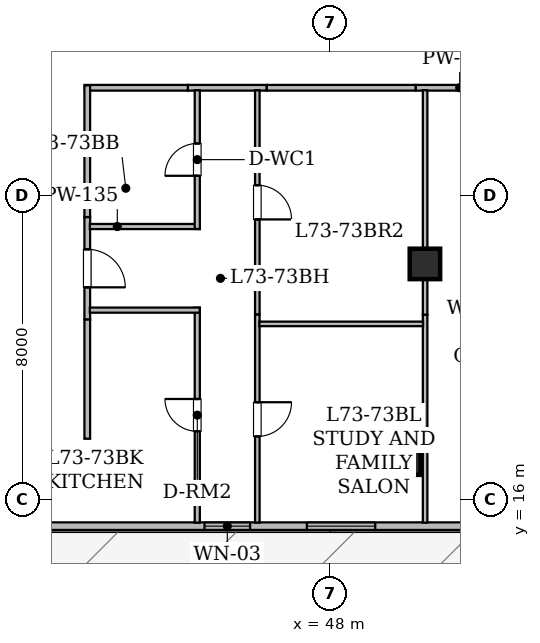
"""IFC4 building model, lengths in metres.
Left out: names, types, materials, properties, quantities, classifications, styles, units other than length and angle.
Written with IfcOpenShell. Run it as: python <this file> out.ifc"""

import sys

from ifc_helpers import new_model, si_unit, direction, frame, frame_2d, origin, origin_2d, place, context, subcontext, project, spatial, rectangle, hollow_rectangle, extrude, element, fill, save


model = new_model("IFC4")
c1 = context("Model", 3, precision=1e-05, world=origin(), true_north=direction((0.0, 1.0)))
c2 = subcontext(c1, "Body", "Model", "MODEL_VIEW")
j1 = project(units=[si_unit("LENGTHUNIT", "METRE"), si_unit("PLANEANGLEUNIT", "RADIAN")], contexts=[c1])
p1 = place(None, origin())
s1 = spatial("IfcSite", under=j1, at=p1, CompositionType="ELEMENT")
p2 = place(p1, origin())
s2 = spatial("IfcBuilding", under=s1, at=p2, CompositionType="ELEMENT")
p3 = place(p2, frame((0.0, 0.0, 286.25)))
s3 = spatial("IfcBuildingStorey", under=s2, at=p3, CompositionType="ELEMENT", Elevation=286.25)
p4 = place(p3, frame((49.983, 17.05, 0.025), z_axis=(0.0, 0.0, 1.0), x_axis=(1.0, 0.0, 0.0)))
e1 = element("IfcColumn", 1, at=p4, inside=s3, PredefinedType="COLUMN", context=c2, shape_type="SweptSolid", body=[
    extrude(hollow_rectangle(XDim=0.8, YDim=0.8, WallThickness=0.04, at=origin_2d()), origin(), (0.0, 0.0, 1.0), 4.175),
])
p5 = place(p3, frame((50.5, 22.2, 0.0), z_axis=(0.0, 0.0, 1.0), x_axis=(1.0, 0.0, 0.0)))
e2 = element("IfcColumn", 2, at=p5, inside=s3, PredefinedType="COLUMN", context=c2, shape_type="SweptSolid", body=[
    extrude(hollow_rectangle(XDim=0.8, YDim=0.8, WallThickness=0.04, at=origin_2d()), origin(), (0.0, 0.0, 1.0), 4.2),
])
p6 = place(p3, frame((61.696, 15.3, 0.0), z_axis=(0.0, 0.0, 1.0), x_axis=(-1.0, 0.0, 0.0)))
e3 = element("IfcWall", 3, at=p6, inside=s3, PredefinedType="STANDARD", context=c2, shape_type="SweptSolid", body=[
    extrude(rectangle(XDim=33.393, YDim=0.2, at=frame_2d((16.697, 0.0))), origin(), (0.0, 0.0, 1.0), 3.95),
])
p7 = place(p6, frame((0.891, 0.0, 0.0)))
e4 = element("IfcOpeningElement", 4, at=p7, cuts=e3, PredefinedType="OPENING", context=c2, shape_type="SweptSolid", body=[
    extrude(rectangle(XDim=1.0, YDim=2.15, at=frame_2d((0.5, 1.075))), frame((0.0, 0.11, 0.0), z_axis=(0.0, -1.0, 0.0), x_axis=(1.0, 0.0, 0.0)), (0.0, 0.0, 1.0), 0.22),
])
p8 = place(p6, frame((6.678, 0.0, 0.85)))
e5 = element("IfcOpeningElement", 5, at=p8, cuts=e3, PredefinedType="OPENING", context=c2, shape_type="SweptSolid", body=[
    extrude(rectangle(XDim=1.8, YDim=0.92, at=frame_2d((0.9, 0.46))), frame((0.0, 0.11, 0.0), z_axis=(0.0, -1.0, 0.0), x_axis=(1.0, 0.0, 0.0)), (0.0, 0.0, 1.0), 0.22),
])
p9 = place(p6, frame((15.796, 0.0, 0.78)))
e6 = element("IfcOpeningElement", 6, at=p9, cuts=e3, PredefinedType="OPENING", context=c2, shape_type="SweptSolid", body=[
    extrude(rectangle(XDim=1.2, YDim=1.5, at=frame_2d((0.6, 0.75))), frame((0.0, 0.11, 0.0), z_axis=(0.0, -1.0, 0.0), x_axis=(1.0, 0.0, 0.0)), (0.0, 0.0, 1.0), 0.22),
])
p10 = place(p6, frame((12.503, 0.0, 0.85)))
e7 = element("IfcOpeningElement", 7, at=p10, cuts=e3, PredefinedType="OPENING", context=c2, shape_type="SweptSolid", body=[
    extrude(rectangle(XDim=1.8, YDim=0.92, at=frame_2d((0.9, 0.46))), frame((0.0, 0.11, 0.0), z_axis=(0.0, -1.0, 0.0), x_axis=(1.0, 0.0, 0.0)), (0.0, 0.0, 1.0), 0.22),
])
p11 = place(p3, frame((57.979, 26.835, 0.0), z_axis=(0.0, 0.0, 1.0), x_axis=(-1.0, 0.0, 0.0)))
e8 = element("IfcWall", 8, at=p11, inside=s3, PredefinedType="STANDARD", context=c2, shape_type="SweptSolid", body=[
    extrude(rectangle(XDim=7.723, YDim=0.15, at=frame_2d((3.861, 0.0))), origin(), (0.0, 0.0, 1.0), 3.245),
])
p12 = place(p11, frame((3.411, 0.0, 0.0)))
e9 = element("IfcOpeningElement", 9, at=p12, cuts=e8, PredefinedType="OPENING", context=c2, shape_type="SweptSolid", body=[
    extrude(rectangle(XDim=0.9, YDim=2.1, at=frame_2d((0.45, 1.05))), frame((0.0, 0.085, 0.0), z_axis=(0.0, -1.0, 0.0), x_axis=(1.0, 0.0, 0.0)), (0.0, 0.0, 1.0), 0.17),
])
p13 = place(p3, frame((46.339, 26.835, 0.0), z_axis=(0.0, 0.0, 1.0), x_axis=(-1.0, 0.0, 0.0)))
e10 = element("IfcWall", 10, at=p13, inside=s3, PredefinedType="STANDARD", context=c2, shape_type="SweptSolid", body=[
    extrude(rectangle(XDim=2.078, YDim=0.15, at=frame_2d((1.039, 0.0))), origin(), (0.0, 0.0, 1.0), 3.95),
])
p14 = place(p3, frame((41.615, 23.433, 0.0), z_axis=(0.0, 0.0, 1.0), x_axis=(0.0, -1.0, 0.0)))
e11 = element("IfcWall", 11, at=p14, inside=s3, PredefinedType="STANDARD", context=c2, shape_type="SweptSolid", body=[
    extrude(rectangle(XDim=2.698, YDim=0.15, at=frame_2d((1.349, 0.0))), origin(), (0.0, 0.0, 1.0), 3.95),
])
p15 = place(p14, frame((0.849, 0.0, 0.0)))
e12 = element("IfcOpeningElement", 12, at=p15, cuts=e11, PredefinedType="OPENING", context=c2, shape_type="SweptSolid", body=[
    extrude(rectangle(XDim=1.0, YDim=2.15, at=frame_2d((0.5, 1.075))), frame((0.0, 0.085, 0.0), z_axis=(0.0, -1.0, 0.0), x_axis=(1.0, 0.0, 0.0)), (0.0, 0.0, 1.0), 0.17),
])
p16 = place(p3, frame((44.261, 26.835, 0.0), z_axis=(0.0, 0.0, 1.0), x_axis=(-1.0, 0.0, 0.0)))
e13 = element("IfcWall", 13, at=p16, inside=s3, PredefinedType="STANDARD", context=c2, shape_type="SweptSolid", body=[
    extrude(rectangle(XDim=2.711, YDim=0.15, at=frame_2d((1.355, 0.0))), origin(), (0.0, 0.0, 1.0), 3.95),
])
p17 = place(p3, frame((41.615, 26.898, 0.0), z_axis=(0.0, 0.0, 1.0), x_axis=(0.0, -1.0, 0.0)))
e14 = element("IfcWall", 14, at=p17, inside=s3, PredefinedType="STANDARD", context=c2, shape_type="SweptSolid", body=[
    extrude(rectangle(XDim=3.465, YDim=0.15, at=frame_2d((1.732, 0.0))), origin(), (0.0, 0.0, 1.0), 3.245),
])
p18 = place(p3, frame((41.615, 20.735, 0.0), z_axis=(0.0, 0.0, 1.0), x_axis=(0.0, -1.0, 0.0)))
e15 = element("IfcWall", 15, at=p18, inside=s3, PredefinedType="STANDARD", context=c2, shape_type="SweptSolid", body=[
    extrude(rectangle(XDim=3.135, YDim=0.15, at=frame_2d((1.567, 0.0))), origin(), (0.0, 0.0, 1.0), 3.477),
])
p19 = place(p3, frame((50.256, 26.835, 0.0), z_axis=(0.0, 0.0, 1.0), x_axis=(-1.0, 0.0, 0.0)))
e16 = element("IfcWall", 16, at=p19, inside=s3, PredefinedType="STANDARD", context=c2, shape_type="SweptSolid", body=[
    extrude(rectangle(XDim=3.917, YDim=0.15, at=frame_2d((1.958, 0.0))), origin(), (0.0, 0.0, 1.0), 3.95),
])
p20 = place(p3, frame((50.505, 15.392, 0.0), z_axis=(0.0, 0.0, 1.0), x_axis=(0.0, 1.0, 0.0)))
e17 = element("IfcWall", 17, at=p20, inside=s3, PredefinedType="PARTITIONING", context=c2, shape_type="SweptSolid", body=[
    extrude(rectangle(XDim=5.474, YDim=0.12, at=frame_2d((2.737, 0.0))), origin(), (0.0, 0.0, 1.0), 3.245),
])
p21 = place(p3, frame((50.505, 20.866, 0.0), z_axis=(0.0, 0.0, 1.0), x_axis=(0.0, 1.0, 0.0)))
e18 = element("IfcWall", 18, at=p21, inside=s3, PredefinedType="PARTITIONING", context=c2, shape_type="SweptSolid", body=[
    extrude(rectangle(XDim=5.904, YDim=0.12, at=frame_2d((2.952, 0.0))), origin(), (0.0, 0.0, 1.0), 3.245),
])
p22 = place(p3, frame((41.682, 23.184, 0.0), z_axis=(0.0, 0.0, 1.0), x_axis=(1.0, 0.0, 0.0)))
e19 = element("IfcWall", 19, at=p22, inside=s3, PredefinedType="PARTITIONING", context=c2, shape_type="SweptSolid", body=[
    extrude(rectangle(XDim=2.893, YDim=0.135, at=frame_2d((1.447, 0.0))), origin(), (0.0, 0.0, 1.0), 3.245),
])
p23 = place(p3, frame((44.51, 23.119, 0.0), z_axis=(0.0, 0.0, 1.0), x_axis=(0.0, 1.0, 0.0)))
e20 = element("IfcWall", 20, at=p23, inside=s3, PredefinedType="PARTITIONING", context=c2, shape_type="SweptSolid", body=[
    extrude(rectangle(XDim=3.651, YDim=0.135, at=frame_2d((1.826, 0.0))), origin(), (0.0, 0.0, 1.0), 3.245),
])
p24 = place(p23, frame((1.4, 0.0, 0.0)))
e21 = element("IfcOpeningElement", 21, at=p24, cuts=e20, PredefinedType="OPENING", context=c2, shape_type="SweptSolid", body=[
    extrude(rectangle(XDim=0.85, YDim=2.1, at=frame_2d((0.425, 1.05))), frame((0.0, 0.077, 0.0), z_axis=(0.0, -1.0, 0.0), x_axis=(1.0, 0.0, 0.0)), (0.0, 0.0, 1.0), 0.155),
])
p25 = place(p3, frame((44.51, 15.392, 0.0), z_axis=(0.0, 0.0, 1.0), x_axis=(0.0, 1.0, 0.0)))
e22 = element("IfcWall", 22, at=p25, inside=s3, PredefinedType="PARTITIONING", context=c2, shape_type="SweptSolid", body=[
    extrude(rectangle(XDim=5.657, YDim=0.135, at=frame_2d((2.829, 0.0))), origin(), (0.0, 0.0, 1.0), 3.407),
])
p26 = place(p25, frame((2.404, 0.0, 0.0)))
e23 = element("IfcOpeningElement", 23, at=p26, cuts=e22, PredefinedType="OPENING", context=c2, shape_type="SweptSolid", body=[
    extrude(rectangle(XDim=0.85, YDim=2.1, at=frame_2d((0.425, 1.05))), frame((0.0, 0.077, 0.0), z_axis=(0.0, -1.0, 0.0), x_axis=(1.0, 0.0, 0.0)), (0.0, 0.0, 1.0), 0.155),
])
p27 = place(p3, frame((44.575, 20.984, 0.0), z_axis=(0.0, 0.0, 1.0), x_axis=(-1.0, 0.0, 0.0)))
e24 = element("IfcWall", 24, at=p27, inside=s3, PredefinedType="PARTITIONING", context=c2, shape_type="SweptSolid", body=[
    extrude(rectangle(XDim=2.893, YDim=0.135, at=frame_2d((1.447, 0.0))), origin(), (0.0, 0.0, 1.0), 3.95),
])
p28 = place(p3, frame((46.09, 20.871, 0.0), z_axis=(0.0, 0.0, 1.0), x_axis=(0.0, -1.0, 0.0)))
e25 = element("IfcWall", 25, at=p28, inside=s3, PredefinedType="PARTITIONING", context=c2, shape_type="SweptSolid", body=[
    extrude(rectangle(XDim=5.479, YDim=0.12, at=frame_2d((2.74, 0.0))), origin(), (0.0, 0.0, 1.0), 3.407),
])
p29 = place(p28, frame((2.31, 0.0, 0.0)))
e26 = element("IfcOpeningElement", 26, at=p29, cuts=e25, PredefinedType="OPENING", context=c2, shape_type="SweptSolid", body=[
    extrude(rectangle(XDim=0.9, YDim=2.1, at=frame_2d((0.45, 1.05))), frame((0.0, 0.07, 0.0), z_axis=(0.0, -1.0, 0.0), x_axis=(1.0, 0.0, 0.0)), (0.0, 0.0, 1.0), 0.14),
])
p30 = place(p3, frame((46.09, 26.77, 0.0), z_axis=(0.0, 0.0, 1.0), x_axis=(0.0, -1.0, 0.0)))
e27 = element("IfcWall", 27, at=p30, inside=s3, PredefinedType="PARTITIONING", context=c2, shape_type="SweptSolid", body=[
    extrude(rectangle(XDim=5.899, YDim=0.12, at=frame_2d((2.949, 0.0))), origin(), (0.0, 0.0, 1.0), 3.245),
])
p31 = place(p30, frame((2.499, 0.0, 0.0)))
e28 = element("IfcOpeningElement", 28, at=p31, cuts=e27, PredefinedType="OPENING", context=c2, shape_type="SweptSolid", body=[
    extrude(rectangle(XDim=0.9, YDim=2.1, at=frame_2d((0.45, 1.05))), frame((0.0, 0.07, 0.0), z_axis=(0.0, -1.0, 0.0), x_axis=(1.0, 0.0, 0.0)), (0.0, 0.0, 1.0), 0.14),
])
p32 = place(p3, frame((46.144, 20.622, 0.0), z_axis=(0.0, 0.0, 1.0), x_axis=(1.0, 0.0, 0.0)))
e29 = element("IfcWall", 29, at=p32, inside=s3, PredefinedType="PARTITIONING", context=c2, shape_type="SweptSolid", body=[
    extrude(rectangle(XDim=4.307, YDim=0.12, at=frame_2d((2.153, 0.0))), origin(), (0.0, 0.0, 1.0), 3.245),
])
p33 = place(p9, origin())
e30 = element("IfcWindow", 30, at=p33, inside=s3, PartitioningType="SINGLE_PANEL", PredefinedType="WINDOW", context=c2, shape_type="SweptSolid", body=[
    extrude(rectangle(XDim=1.2, YDim=1.5, at=frame_2d((0.6, 0.75))), frame((0.0, 0.03, 0.0), z_axis=(0.0, -1.0, 0.0), x_axis=(1.0, 0.0, 0.0)), (0.0, 0.0, 1.0), 0.06),
])
fill(e6, e30)
p34 = place(p10, origin())
e31 = element("IfcWindow", 31, at=p34, inside=s3, PartitioningType="SINGLE_PANEL", PredefinedType="WINDOW", context=c2, shape_type="SweptSolid", body=[
    extrude(rectangle(XDim=1.8, YDim=0.92, at=frame_2d((0.9, 0.46))), frame((0.0, 0.03, 0.0), z_axis=(0.0, -1.0, 0.0), x_axis=(1.0, 0.0, 0.0)), (0.0, 0.0, 1.0), 0.06),
])
fill(e7, e31)
p35 = place(p15, origin())
e32 = element("IfcDoor", 32, at=p35, inside=s3, OperationType="SINGLE_SWING_RIGHT", PredefinedType="DOOR", context=c2, shape_type="SweptSolid", body=[
    extrude(rectangle(XDim=1.0, YDim=2.15, at=frame_2d((0.5, 1.075))), frame((0.0, 0.025, 0.0), z_axis=(0.0, -1.0, 0.0), x_axis=(1.0, 0.0, 0.0)), (0.0, 0.0, 1.0), 0.05),
])
fill(e12, e32)
p36 = place(p24, origin())
e33 = element("IfcDoor", 33, at=p36, inside=s3, OperationType="SINGLE_SWING_LEFT", PredefinedType="DOOR", context=c2, shape_type="SweptSolid", body=[
    extrude(rectangle(XDim=0.85, YDim=2.1, at=frame_2d((0.425, 1.05))), frame((0.0, 0.025, 0.0), z_axis=(0.0, -1.0, 0.0), x_axis=(1.0, 0.0, 0.0)), (0.0, 0.0, 1.0), 0.05),
])
fill(e21, e33)
p37 = place(p26, origin())
e34 = element("IfcDoor", 34, at=p37, inside=s3, OperationType="SINGLE_SWING_RIGHT", PredefinedType="DOOR", context=c2, shape_type="SweptSolid", body=[
    extrude(rectangle(XDim=0.85, YDim=2.1, at=frame_2d((0.425, 1.05))), frame((0.0, 0.025, 0.0), z_axis=(0.0, -1.0, 0.0), x_axis=(1.0, 0.0, 0.0)), (0.0, 0.0, 1.0), 0.05),
])
fill(e23, e34)
p38 = place(p29, origin())
e35 = element("IfcDoor", 35, at=p38, inside=s3, OperationType="SINGLE_SWING_LEFT", PredefinedType="DOOR", context=c2, shape_type="SweptSolid", body=[
    extrude(rectangle(XDim=0.9, YDim=2.1, at=frame_2d((0.45, 1.05))), frame((0.0, 0.025, 0.0), z_axis=(0.0, -1.0, 0.0), x_axis=(1.0, 0.0, 0.0)), (0.0, 0.0, 1.0), 0.05),
])
fill(e26, e35)
p39 = place(p31, origin())
e36 = element("IfcDoor", 36, at=p39, inside=s3, OperationType="SINGLE_SWING_RIGHT", PredefinedType="DOOR", context=c2, shape_type="SweptSolid", body=[
    extrude(rectangle(XDim=0.9, YDim=2.1, at=frame_2d((0.45, 1.05))), frame((0.0, 0.025, 0.0), z_axis=(0.0, -1.0, 0.0), x_axis=(1.0, 0.0, 0.0)), (0.0, 0.0, 1.0), 0.05),
])
fill(e28, e36)
save(model, sys.argv[1])
